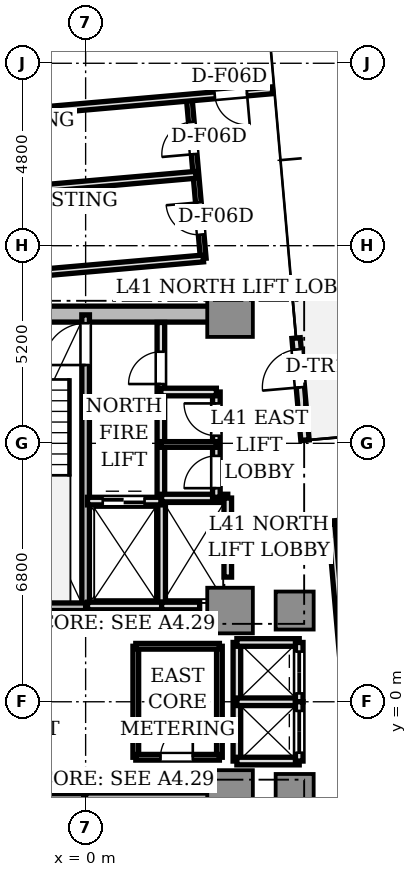
"""IFC4 building model, lengths in metres.
Left out: names, types, materials, properties, quantities, classifications, styles, units other than length and angle.
Written with IfcOpenShell. Run it as: python <this file> out.ifc"""

import sys

from ifc_helpers import new_model, si_unit, direction, frame, frame_2d, origin, origin_2d, place, context, subcontext, project, spatial, rectangle, extrude, source, transform, mapped, element, fill, save


model = new_model("IFC4")
c1 = context("Model", 3, precision=1e-05, world=origin(), true_north=direction((0.0, 1.0)))
c2 = subcontext(c1, "Body", "Model", "MODEL_VIEW")
j1 = project(units=[si_unit("LENGTHUNIT", "METRE"), si_unit("PLANEANGLEUNIT", "RADIAN")], contexts=[c1])
p1 = place(None, origin())
s1 = spatial("IfcSite", under=j1, at=p1, CompositionType="ELEMENT")
p2 = place(p1, origin())
s2 = spatial("IfcBuilding", under=s1, at=p2, CompositionType="ELEMENT")
p3 = place(p2, frame((0.0, 0.0, 150.6)))
s3 = spatial("IfcBuildingStorey", under=s2, at=p3, CompositionType="ELEMENT", Elevation=150.6)
p4 = place(p3, frame((-3.55, 10.2, 0.0), z_axis=(0.0, 0.0, 1.0), x_axis=(1.0, 0.0, 0.0)))
e1 = element("IfcWall", 1, at=p4, inside=s3, PredefinedType="SHEAR", context=c2, shape_type="SweptSolid", body=[
    extrude(rectangle(XDim=7.1, YDim=0.42, at=frame_2d((3.55, 0.0))), origin(), (0.0, 0.0, 1.0), 3.11),
])
m1 = source(origin(), c2, "Body", "SweptSolid", [
    extrude(rectangle(XDim=1.2, YDim=1.2, at=origin_2d()), origin(), (0.0, 0.0, 1.0), 3.11),
])
for number, where, z_axis, x_axis in (
    (2, (3.8, 2.4, 0.0), (0.0, 0.0, 1.0), (1.0, 0.0, 0.0)),
    (3, (3.8, 10.2, 0.0), (0.0, 0.0, 1.0), (1.0, 0.0, 0.0)),
    (4, (3.8, -2.4, 0.0), (0.0, 0.0, 1.0), (1.0, 0.0, 0.0)),
):
    element("IfcColumn", number, at=place(p3, frame(where, z_axis=z_axis, x_axis=x_axis)), inside=s3, PredefinedType="COLUMN", context=c2, shape_type="MappedRepresentation", body=[
        mapped(m1, transform((0.0, 0.0, 0.0), scale=1.0)),
    ])
m2 = source(origin(), c2, "Body", "SweptSolid", [
    extrude(rectangle(XDim=1.0, YDim=1.0, at=origin_2d()), origin(), (0.0, 0.0, 1.0), 3.11),
])
for number, where, z_axis, x_axis in (
    (5, (5.5, 2.4, 0.0), (0.0, 0.0, 1.0), (1.0, 0.0, 0.0)),
    (6, (5.5, -2.4, 0.0), (0.0, 0.0, 1.0), (1.0, 0.0, 0.0)),
):
    element("IfcColumn", number, at=place(p3, frame(where, z_axis=z_axis, x_axis=x_axis)), inside=s3, PredefinedType="COLUMN", context=c2, shape_type="MappedRepresentation", body=[
        mapped(m2, transform((0.0, 0.0, 0.0), scale=1.0)),
    ])
p5 = place(p3, frame((5.772, 6.879, 0.0), z_axis=(0.0, 0.0, 1.0), x_axis=(-0.087168071984, 0.996193619346, 0.0)))
e7 = element("IfcWall", 7, at=p5, inside=s3, PredefinedType="STANDARD", context=c2, shape_type="SweptSolid", body=[
    extrude(rectangle(XDim=2.7, YDim=0.22, at=frame_2d((1.35, 0.0))), origin(), (0.0, 0.0, 1.0), 3.11),
])
p6 = place(p5, frame((1.4, 0.0, 0.0)))
e8 = element("IfcOpeningElement", 8, at=p6, cuts=e7, PredefinedType="OPENING", context=c2, shape_type="SweptSolid", body=[
    extrude(rectangle(XDim=1.0, YDim=2.2, at=frame_2d((0.5, 1.1))), frame((0.0, 0.12, 0.0), z_axis=(0.0, -1.0, 0.0), x_axis=(1.0, 0.0, 0.0)), (0.0, 0.0, 1.0), 0.24),
])
p7 = place(p3, frame((0.0, 2.5, 0.0), z_axis=(0.0, 0.0, 1.0), x_axis=(0.0, 1.0, 0.0)))
e9 = element("IfcWall", 9, at=p7, inside=s3, PredefinedType="SOLIDWALL", context=c2, shape_type="SweptSolid", body=[
    extrude(rectangle(XDim=7.68, YDim=0.2, at=frame_2d((3.84, 0.0))), origin(), (0.0, 0.0, 1.0), 3.11),
])
p8 = place(p7, frame((6.36, 0.0, 0.0)))
e10 = element("IfcOpeningElement", 10, at=p8, cuts=e9, PredefinedType="OPENING", context=c2, shape_type="SweptSolid", body=[
    extrude(rectangle(XDim=1.1, YDim=2.15, at=frame_2d((0.55, 1.075))), frame((0.0, 0.11, 0.0), z_axis=(0.0, -1.0, 0.0), x_axis=(1.0, 0.0, 0.0)), (0.0, 0.0, 1.0), 0.22),
])
p9 = place(p3, frame((-3.72, 2.5, 0.0), z_axis=(0.0, 0.0, 1.0), x_axis=(1.0, 0.0, 0.0)))
e11 = element("IfcWall", 11, at=p9, inside=s3, PredefinedType="SOLIDWALL", context=c2, shape_type="SweptSolid", body=[
    extrude(rectangle(XDim=3.72, YDim=0.2, at=frame_2d((1.86, 0.0))), origin(), (0.0, 0.0, 1.0), 3.11),
])
p10 = place(p3, frame((0.0, -10.18, 0.0), z_axis=(0.0, 0.0, 1.0), x_axis=(0.0, 1.0, 0.0)))
e12 = element("IfcWall", 12, at=p10, inside=s3, PredefinedType="SOLIDWALL", context=c2, shape_type="SweptSolid", body=[
    extrude(rectangle(XDim=7.68, YDim=0.2, at=frame_2d((3.84, 0.0))), origin(), (0.0, 0.0, 1.0), 3.11),
])
p11 = place(p10, frame((0.28, 0.0, 0.0)))
e13 = element("IfcOpeningElement", 13, at=p11, cuts=e12, PredefinedType="OPENING", context=c2, shape_type="SweptSolid", body=[
    extrude(rectangle(XDim=1.1, YDim=2.15, at=frame_2d((0.55, 1.075))), frame((0.0, 0.11, 0.0), z_axis=(0.0, -1.0, 0.0), x_axis=(1.0, 0.0, 0.0)), (0.0, 0.0, 1.0), 0.22),
])
p12 = place(p3, frame((0.0, -2.5, 0.0), z_axis=(0.0, 0.0, 1.0), x_axis=(1.0, 0.0, 0.0)))
e14 = element("IfcWall", 14, at=p12, inside=s3, PredefinedType="SOLIDWALL", context=c2, shape_type="SweptSolid", body=[
    extrude(rectangle(XDim=3.72, YDim=0.2, at=frame_2d((1.86, 0.0))), origin(), (0.0, 0.0, 1.0), 3.11),
])
p13 = place(p3, frame((1.98, 5.32, 0.0), z_axis=(0.0, 0.0, 1.0), x_axis=(0.0, 1.0, 0.0)))
e15 = element("IfcWall", 15, at=p13, inside=s3, PredefinedType="SOLIDWALL", context=c2, shape_type="SweptSolid", body=[
    extrude(rectangle(XDim=4.66, YDim=0.2, at=frame_2d((2.33, 0.0))), origin(), (0.0, 0.0, 1.0), 2.66),
])
p14 = place(p13, frame((3.04, 0.0, 0.0)))
e16 = element("IfcOpeningElement", 16, at=p14, cuts=e15, PredefinedType="OPENING", context=c2, shape_type="SweptSolid", body=[
    extrude(rectangle(XDim=0.85, YDim=2.1, at=frame_2d((0.425, 1.05))), frame((0.0, 0.11, 0.0), z_axis=(0.0, -1.0, 0.0), x_axis=(1.0, 0.0, 0.0)), (0.0, 0.0, 1.0), 0.22),
])
p15 = place(p3, frame((2.0, 2.5, 0.0), z_axis=(0.0, 0.0, 1.0), x_axis=(0.0, 1.0, 0.0)))
e17 = element("IfcWall", 17, at=p15, inside=s3, PredefinedType="SOLIDWALL", context=c2, shape_type="SweptSolid", body=[
    extrude(rectangle(XDim=2.78, YDim=0.2, at=frame_2d((1.39, 0.0))), origin(), (0.0, 0.0, 1.0), 2.66),
])
p16 = place(p3, frame((0.05, 2.52, 0.0), z_axis=(0.0, 0.0, 1.0), x_axis=(1.0, 0.0, 0.0)))
e18 = element("IfcWall", 18, at=p16, inside=s3, PredefinedType="SOLIDWALL", context=c2, shape_type="SweptSolid", body=[
    extrude(rectangle(XDim=1.95, YDim=0.2, at=frame_2d((0.975, 0.0))), origin(), (0.0, 0.0, 1.0), 2.66),
])
p17 = place(p3, frame((0.05, 5.28, 0.0), z_axis=(0.0, 0.0, 1.0), x_axis=(1.0, 0.0, 0.0)))
e19 = element("IfcWall", 19, at=p17, inside=s3, PredefinedType="SOLIDWALL", context=c2, shape_type="SweptSolid", body=[
    extrude(rectangle(XDim=1.93, YDim=0.2, at=frame_2d((0.965, 0.0))), origin(), (0.0, 0.0, 1.0), 2.66),
])
p18 = place(p17, frame((0.4, 0.0, 0.0)))
e20 = element("IfcOpeningElement", 20, at=p18, cuts=e19, PredefinedType="OPENING", context=c2, shape_type="SweptSolid", body=[
    extrude(rectangle(XDim=1.1, YDim=2.2, at=frame_2d((0.55, 1.1))), frame((0.0, 0.11, 0.0), z_axis=(0.0, -1.0, 0.0), x_axis=(1.0, 0.0, 0.0)), (0.0, 0.0, 1.0), 0.22),
])
p19 = place(p3, frame((-2.0, -2.52, 0.0), z_axis=(0.0, 0.0, 1.0), x_axis=(1.0, 0.0, 0.0)))
e21 = element("IfcWall", 21, at=p19, inside=s3, PredefinedType="SOLIDWALL", context=c2, shape_type="SweptSolid", body=[
    extrude(rectangle(XDim=1.95, YDim=0.2, at=frame_2d((0.975, 0.0))), origin(), (0.0, 0.0, 1.0), 2.66),
])
p20 = place(p3, frame((2.0, 2.52, 0.0), z_axis=(0.0, 0.0, 1.0), x_axis=(1.0, 0.0, 0.0)))
e22 = element("IfcWall", 22, at=p20, inside=s3, PredefinedType="SOLIDWALL", context=c2, shape_type="SweptSolid", body=[
    extrude(rectangle(XDim=1.0, YDim=0.2, at=frame_2d((0.5, 0.0))), origin(), (0.0, 0.0, 1.0), 2.66),
])
p21 = place(p3, frame((2.0, 5.36, 0.0), z_axis=(0.0, 0.0, 1.0), x_axis=(1.0, 0.0, 0.0)))
e23 = element("IfcWall", 23, at=p21, inside=s3, PredefinedType="SOLIDWALL", context=c2, shape_type="SweptSolid", body=[
    extrude(rectangle(XDim=1.74, YDim=0.2, at=frame_2d((0.87, 0.0))), origin(), (0.0, 0.0, 1.0), 2.66),
])
p22 = place(p3, frame((3.74, 3.28, 0.0), z_axis=(0.0, 0.0, 1.0), x_axis=(0.0, 1.0, 0.0)))
e24 = element("IfcWall", 24, at=p22, inside=s3, PredefinedType="SOLIDWALL", context=c2, shape_type="SweptSolid", body=[
    extrude(rectangle(XDim=2.08, YDim=0.2, at=frame_2d((1.04, 0.0))), origin(), (0.0, 0.0, 1.0), 2.66),
])
p23 = place(p22, frame((0.44, 0.0, 0.0)))
e25 = element("IfcOpeningElement", 25, at=p23, cuts=e24, PredefinedType="OPENING", context=c2, shape_type="SweptSolid", body=[
    extrude(rectangle(XDim=1.2, YDim=2.2, at=frame_2d((0.6, 1.1))), frame((0.0, 0.11, 0.0), z_axis=(0.0, -1.0, 0.0), x_axis=(1.0, 0.0, 0.0)), (0.0, 0.0, 1.0), 0.22),
])
p24 = place(p3, frame((3.98, -1.56, 0.0), z_axis=(0.0, 0.0, 1.0), x_axis=(0.0, 1.0, 0.0)))
e26 = element("IfcWall", 26, at=p24, inside=s3, PredefinedType="SOLIDWALL", context=c2, shape_type="SweptSolid", body=[
    extrude(rectangle(XDim=3.12, YDim=0.2, at=frame_2d((1.56, 0.0))), origin(), (0.0, 0.0, 1.0), 2.28),
])
for number, where, z_axis, x_axis in (
    (27, (3.98, 1.56, 0.0), (0.0, 0.0, 1.0), (1.0, 0.0, 0.0)),
    (28, (3.98, -1.56, 0.0), (0.0, 0.0, 1.0), (1.0, 0.0, 0.0)),
    (29, (3.98, 0.0, 0.0), (0.0, 0.0, 1.0), (1.0, 0.0, 0.0)),
):
    element("IfcWall", number, at=place(p3, frame(where, z_axis=z_axis, x_axis=x_axis)), inside=s3, PredefinedType="SOLIDWALL", context=c2, shape_type="SweptSolid", body=[
        extrude(rectangle(XDim=1.64, YDim=0.2, at=frame_2d((0.82, 0.0))), origin(), (0.0, 0.0, 1.0), 2.66),
    ])
p25 = place(p3, frame((5.62, 0.0, 0.0), z_axis=(0.0, 0.0, 1.0), x_axis=(0.0, 1.0, 0.0)))
e30 = element("IfcWall", 30, at=p25, inside=s3, PredefinedType="SOLIDWALL", context=c2, shape_type="SweptSolid", body=[
    extrude(rectangle(XDim=1.56, YDim=0.2, at=frame_2d((0.78, 0.0))), origin(), (0.0, 0.0, 1.0), 2.66),
])
p26 = place(p25, frame((0.22, 0.0, 0.0)))
e31 = element("IfcOpeningElement", 31, at=p26, cuts=e30, PredefinedType="OPENING", context=c2, shape_type="SweptSolid", body=[
    extrude(rectangle(XDim=1.1, YDim=2.2, at=frame_2d((0.55, 1.1))), frame((0.0, 0.11, 0.0), z_axis=(0.0, -1.0, 0.0), x_axis=(1.0, 0.0, 0.0)), (0.0, 0.0, 1.0), 0.22),
])
p27 = place(p3, frame((5.62, -1.56, 0.0), z_axis=(0.0, 0.0, 1.0), x_axis=(0.0, 1.0, 0.0)))
e32 = element("IfcWall", 32, at=p27, inside=s3, PredefinedType="SOLIDWALL", context=c2, shape_type="SweptSolid", body=[
    extrude(rectangle(XDim=1.56, YDim=0.2, at=frame_2d((0.78, 0.0))), origin(), (0.0, 0.0, 1.0), 2.66),
])
p28 = place(p27, frame((0.22, 0.0, 0.0)))
e33 = element("IfcOpeningElement", 33, at=p28, cuts=e32, PredefinedType="OPENING", context=c2, shape_type="SweptSolid", body=[
    extrude(rectangle(XDim=1.1, YDim=2.2, at=frame_2d((0.55, 1.1))), frame((0.0, 0.11, 0.0), z_axis=(0.0, -1.0, 0.0), x_axis=(1.0, 0.0, 0.0)), (0.0, 0.0, 1.0), 0.22),
])
p29 = place(p3, frame((3.44, 5.38, 0.0), z_axis=(0.0, 0.0, 1.0), x_axis=(0.0, 1.0, 0.0)))
e34 = element("IfcWall", 34, at=p29, inside=s3, PredefinedType="SOLIDWALL", context=c2, shape_type="SweptSolid", body=[
    extrude(rectangle(XDim=2.77, YDim=0.2, at=frame_2d((1.385, 0.0))), origin(), (0.0, 0.0, 1.0), 2.66),
])
p30 = place(p29, frame((0.24, 0.0, 0.0)))
e35 = element("IfcOpeningElement", 35, at=p30, cuts=e34, PredefinedType="OPENING", context=c2, shape_type="SweptSolid", body=[
    extrude(rectangle(XDim=0.85, YDim=2.1, at=frame_2d((0.425, 1.05))), frame((0.0, 0.11, 0.0), z_axis=(0.0, -1.0, 0.0), x_axis=(1.0, 0.0, 0.0)), (0.0, 0.0, 1.0), 0.22),
])
p31 = place(p29, frame((1.62, 0.0, 0.0)))
e36 = element("IfcOpeningElement", 36, at=p31, cuts=e34, PredefinedType="OPENING", context=c2, shape_type="SweptSolid", body=[
    extrude(rectangle(XDim=0.85, YDim=2.1, at=frame_2d((0.425, 1.05))), frame((0.0, 0.11, 0.0), z_axis=(0.0, -1.0, 0.0), x_axis=(1.0, 0.0, 0.0)), (0.0, 0.0, 1.0), 0.22),
])
p32 = place(p3, frame((1.98, 8.15, 0.0), z_axis=(0.0, 0.0, 1.0), x_axis=(1.0, 0.0, 0.0)))
e37 = element("IfcWall", 37, at=p32, inside=s3, PredefinedType="SOLIDWALL", context=c2, shape_type="SweptSolid", body=[
    extrude(rectangle(XDim=1.46, YDim=0.2, at=frame_2d((0.73, 0.0))), origin(), (0.0, 0.0, 1.0), 2.66),
])
p33 = place(p3, frame((1.98, 6.77, 0.0), z_axis=(0.0, 0.0, 1.0), x_axis=(1.0, 0.0, 0.0)))
e38 = element("IfcWall", 38, at=p33, inside=s3, PredefinedType="PARTITIONING", context=c2, shape_type="SweptSolid", body=[
    extrude(rectangle(XDim=1.46, YDim=0.15, at=frame_2d((0.73, 0.0))), origin(), (0.0, 0.0, 1.0), 2.66),
])
p34 = place(p3, frame((1.32, -1.46, 0.0), z_axis=(0.0, 0.0, 1.0), x_axis=(0.0, 1.0, 0.0)))
e39 = element("IfcWall", 39, at=p34, inside=s3, PredefinedType="PARTITIONING", context=c2, shape_type="SweptSolid", body=[
    extrude(rectangle(XDim=2.92, YDim=0.15, at=frame_2d((1.46, 0.0))), origin(), (0.0, 0.0, 1.0), 2.66),
])
p35 = place(p3, frame((3.52, -1.46, 0.0), z_axis=(0.0, 0.0, 1.0), x_axis=(0.0, 1.0, 0.0)))
e40 = element("IfcWall", 40, at=p35, inside=s3, PredefinedType="PARTITIONING", context=c2, shape_type="SweptSolid", body=[
    extrude(rectangle(XDim=2.92, YDim=0.15, at=frame_2d((1.46, 0.0))), origin(), (0.0, 0.0, 1.0), 2.28),
])
p36 = place(p3, frame((1.32, 1.46, 0.0), z_axis=(0.0, 0.0, 1.0), x_axis=(1.0, 0.0, 0.0)))
e41 = element("IfcWall", 41, at=p36, inside=s3, PredefinedType="PARTITIONING", context=c2, shape_type="SweptSolid", body=[
    extrude(rectangle(XDim=2.2, YDim=0.15, at=frame_2d((1.1, 0.0))), origin(), (0.0, 0.0, 1.0), 2.66),
])
p37 = place(p3, frame((1.32, -1.46, 0.0), z_axis=(0.0, 0.0, 1.0), x_axis=(1.0, 0.0, 0.0)))
e42 = element("IfcWall", 42, at=p37, inside=s3, PredefinedType="PARTITIONING", context=c2, shape_type="SweptSolid", body=[
    extrude(rectangle(XDim=2.2, YDim=0.15, at=frame_2d((1.1, 0.0))), origin(), (0.0, 0.0, 1.0), 2.66),
])
p38 = place(p37, frame((0.65, 0.0, 0.0)))
e43 = element("IfcOpeningElement", 43, at=p38, cuts=e42, PredefinedType="OPENING", context=c2, shape_type="SweptSolid", body=[
    extrude(rectangle(XDim=0.85, YDim=2.1, at=frame_2d((0.425, 1.05))), frame((0.0, 0.085, 0.0), z_axis=(0.0, -1.0, 0.0), x_axis=(1.0, 0.0, 0.0)), (0.0, 0.0, 1.0), 0.17),
])
p39 = place(p3, frame((6.467, 4.681, 0.0), z_axis=(0.0, 0.0, 1.0), x_axis=(0.996195452949, 0.087147114263, 0.0)))
e44 = element("IfcWall", 44, at=p39, inside=s3, PredefinedType="PARTITIONING", context=c2, shape_type="SweptSolid", body=[
    extrude(rectangle(XDim=8.55, YDim=0.15, at=frame_2d((4.275, 0.0))), origin(), (0.0, 0.0, 1.0), 2.66),
])
p40 = place(p39, frame((1.491, 0.0, 0.0)))
e45 = element("IfcOpeningElement", 45, at=p40, cuts=e44, PredefinedType="OPENING", context=c2, shape_type="SweptSolid", body=[
    extrude(rectangle(XDim=0.85, YDim=2.1, at=frame_2d((0.425, 1.05))), frame((0.0, 0.085, 0.0), z_axis=(0.0, -1.0, 0.0), x_axis=(1.0, 0.0, 0.0)), (0.0, 0.0, 1.0), 0.17),
])
p41 = place(p39, frame((4.792, 0.0, 0.0)))
e46 = element("IfcOpeningElement", 46, at=p41, cuts=e44, PredefinedType="OPENING", context=c2, shape_type="SweptSolid", body=[
    extrude(rectangle(XDim=0.85, YDim=2.1, at=frame_2d((0.425, 1.05))), frame((0.0, 0.085, 0.0), z_axis=(0.0, -1.0, 0.0), x_axis=(1.0, 0.0, 0.0)), (0.0, 0.0, 1.0), 0.17),
])
p42 = place(p3, frame((7.373, -5.679, 0.0), z_axis=(0.0, 0.0, 1.0), x_axis=(-0.087163455754, 0.996194023261, 0.0)))
e47 = element("IfcWall", 47, at=p42, inside=s3, PredefinedType="PARTITIONING", context=c2, shape_type="SweptSolid", body=[
    extrude(rectangle(XDim=10.4, YDim=0.18, at=frame_2d((5.2, 0.0))), origin(), (0.0, 0.0, 1.0), 2.66),
])
p43 = place(p3, frame((3.095, 11.664, 0.0), z_axis=(0.0, 0.0, 1.0), x_axis=(-0.087142722004, 0.996195837173, 0.0)))
e48 = element("IfcWall", 48, at=p43, inside=s3, PredefinedType="PARTITIONING", context=c2, shape_type="SweptSolid", body=[
    extrude(rectangle(XDim=4.25, YDim=0.15, at=frame_2d((2.125, 0.0))), origin(), (0.0, 0.0, 1.0), 2.66),
])
p44 = place(p43, frame((0.63, 0.0, 0.0)))
e49 = element("IfcOpeningElement", 49, at=p44, cuts=e48, PredefinedType="OPENING", context=c2, shape_type="SweptSolid", body=[
    extrude(rectangle(XDim=0.85, YDim=2.1, at=frame_2d((0.425, 1.05))), frame((0.0, 0.085, 0.0), z_axis=(0.0, -1.0, 0.0), x_axis=(1.0, 0.0, 0.0)), (0.0, 0.0, 1.0), 0.17),
])
p45 = place(p43, frame((2.755, 0.0, 0.0)))
e50 = element("IfcOpeningElement", 50, at=p45, cuts=e48, PredefinedType="OPENING", context=c2, shape_type="SweptSolid", body=[
    extrude(rectangle(XDim=0.85, YDim=2.1, at=frame_2d((0.425, 1.05))), frame((0.0, 0.085, 0.0), z_axis=(0.0, -1.0, 0.0), x_axis=(1.0, 0.0, 0.0)), (0.0, 0.0, 1.0), 0.17),
])
p46 = place(p3, frame((3.095, 11.664, 0.0), z_axis=(0.0, 0.0, 1.0), x_axis=(-0.996196061386, -0.087140158824, 0.0)))
e51 = element("IfcWall", 51, at=p46, inside=s3, PredefinedType="PARTITIONING", context=c2, shape_type="SweptSolid", body=[
    extrude(rectangle(XDim=10.4, YDim=0.18, at=frame_2d((5.2, 0.0))), origin(), (0.0, 0.0, 1.0), 2.66),
])
p47 = place(p3, frame((2.903, 13.866, 0.0), z_axis=(0.0, 0.0, 1.0), x_axis=(-0.996194201607, -0.087161417409, 0.0)))
e52 = element("IfcWall", 52, at=p47, inside=s3, PredefinedType="PARTITIONING", context=c2, shape_type="SweptSolid", body=[
    extrude(rectangle(XDim=10.4, YDim=0.18, at=frame_2d((5.2, 0.0))), origin(), (0.0, 0.0, 1.0), 2.66),
])
p48 = place(p3, frame((4.917, 16.09, 0.0), z_axis=(0.0, 0.0, 1.0), x_axis=(-0.996196619285, -0.087133780622, 0.0)))
e53 = element("IfcWall", 53, at=p48, inside=s3, PredefinedType="PARTITIONING", context=c2, shape_type="SweptSolid", body=[
    extrude(rectangle(XDim=12.6, YDim=0.18, at=frame_2d((6.3, 0.0))), origin(), (0.0, 0.0, 1.0), 2.66),
])
p49 = place(p48, frame((0.675, 0.0, 0.0)))
e54 = element("IfcOpeningElement", 54, at=p49, cuts=e53, PredefinedType="OPENING", context=c2, shape_type="SweptSolid", body=[
    extrude(rectangle(XDim=0.85, YDim=2.1, at=frame_2d((0.425, 1.05))), frame((0.0, 0.1, 0.0), z_axis=(0.0, -1.0, 0.0), x_axis=(1.0, 0.0, 0.0)), (0.0, 0.0, 1.0), 0.2),
])
m3 = source(origin(), c2, "Body", "SweptSolid", [
    extrude(rectangle(XDim=1.0, YDim=0.05, at=origin_2d()), origin(), (0.0, 0.0, 1.0), 2.2),
])
p50 = place(p6, frame((0.5, 0.0, 0.0)))
e55 = element("IfcDoor", 55, at=p50, inside=s3, OperationType="SINGLE_SWING_LEFT", PredefinedType="DOOR", context=c2, shape_type="MappedRepresentation", body=[
    mapped(m3, transform((0.0, 0.0, 0.0), scale=1.0)),
])
fill(e8, e55)
m4 = source(origin(), c2, "Body", "SweptSolid", [
    extrude(rectangle(XDim=1.1, YDim=0.05, at=origin_2d()), origin(), (0.0, 0.0, 1.0), 2.15),
])
p51 = place(p8, frame((0.55, 0.0, 0.0)))
e56 = element("IfcDoor", 56, at=p51, inside=s3, OperationType="SINGLE_SWING_LEFT", PredefinedType="DOOR", context=c2, shape_type="MappedRepresentation", body=[
    mapped(m4, transform((0.0, 0.0, 0.0), scale=1.0)),
])
fill(e10, e56)
m5 = source(origin(), c2, "Body", "SweptSolid", [
    extrude(rectangle(XDim=0.85, YDim=0.05, at=origin_2d()), origin(), (0.0, 0.0, 1.0), 2.1),
])
p52 = place(p14, frame((0.425, 0.0, 0.0)))
e57 = element("IfcDoor", 57, at=p52, inside=s3, OperationType="SINGLE_SWING_LEFT", PredefinedType="DOOR", context=c2, shape_type="MappedRepresentation", body=[
    mapped(m5, transform((0.0, 0.0, 0.0), scale=1.0)),
])
fill(e16, e57)
m6 = source(origin(), c2, "Body", "SweptSolid", [
    extrude(rectangle(XDim=1.1, YDim=0.05, at=origin_2d()), origin(), (0.0, 0.0, 1.0), 2.2),
])
p53 = place(p18, frame((0.55, 0.0, 0.0)))
e58 = element("IfcDoor", 58, at=p53, inside=s3, OperationType="DOUBLE_DOOR_SLIDING", PredefinedType="DOOR", context=c2, shape_type="MappedRepresentation", body=[
    mapped(m6, transform((0.0, 0.0, 0.0), scale=1.0)),
])
fill(e20, e58)
m7 = source(origin(), c2, "Body", "SweptSolid", [
    extrude(rectangle(XDim=1.2, YDim=0.05, at=origin_2d()), origin(), (0.0, 0.0, 1.0), 2.2),
])
p54 = place(p23, frame((0.6, 0.0, 0.0)))
e59 = element("IfcDoor", 59, at=p54, inside=s3, OperationType="DOUBLE_DOOR_SLIDING", PredefinedType="DOOR", context=c2, shape_type="MappedRepresentation", body=[
    mapped(m7, transform((0.0, 0.0, 0.0), scale=1.0)),
])
fill(e25, e59)
p55 = place(p26, frame((0.55, 0.0, 0.0)))
e60 = element("IfcDoor", 60, at=p55, inside=s3, OperationType="DOUBLE_DOOR_SLIDING", PredefinedType="DOOR", context=c2, shape_type="MappedRepresentation", body=[
    mapped(m6, transform((0.0, 0.0, 0.0), scale=1.0)),
])
fill(e31, e60)
p56 = place(p28, frame((0.55, 0.0, 0.0)))
e61 = element("IfcDoor", 61, at=p56, inside=s3, OperationType="DOUBLE_DOOR_SLIDING", PredefinedType="DOOR", context=c2, shape_type="MappedRepresentation", body=[
    mapped(m6, transform((0.0, 0.0, 0.0), scale=1.0)),
])
fill(e33, e61)
p57 = place(p30, frame((0.425, 0.0, 0.0)))
e62 = element("IfcDoor", 62, at=p57, inside=s3, OperationType="SINGLE_SWING_LEFT", PredefinedType="DOOR", context=c2, shape_type="MappedRepresentation", body=[
    mapped(m5, transform((0.0, 0.0, 0.0), scale=1.0)),
])
fill(e35, e62)
p58 = place(p31, frame((0.425, 0.0, 0.0)))
e63 = element("IfcDoor", 63, at=p58, inside=s3, OperationType="SINGLE_SWING_RIGHT", PredefinedType="DOOR", context=c2, shape_type="MappedRepresentation", body=[
    mapped(m5, transform((0.0, 0.0, 0.0), scale=1.0)),
])
fill(e36, e63)
p59 = place(p38, frame((0.425, 0.0, 0.0)))
e64 = element("IfcDoor", 64, at=p59, inside=s3, OperationType="SINGLE_SWING_RIGHT", PredefinedType="DOOR", context=c2, shape_type="MappedRepresentation", body=[
    mapped(m5, transform((0.0, 0.0, 0.0), scale=1.0)),
])
fill(e43, e64)
p60 = place(p44, frame((0.425, 0.0, 0.0)))
e65 = element("IfcDoor", 65, at=p60, inside=s3, OperationType="SINGLE_SWING_RIGHT", PredefinedType="DOOR", context=c2, shape_type="MappedRepresentation", body=[
    mapped(m5, transform((0.0, 0.0, 0.0), scale=1.0)),
])
fill(e49, e65)
p61 = place(p45, frame((0.425, 0.0, 0.0)))
e66 = element("IfcDoor", 66, at=p61, inside=s3, OperationType="SINGLE_SWING_LEFT", PredefinedType="DOOR", context=c2, shape_type="MappedRepresentation", body=[
    mapped(m5, transform((0.0, 0.0, 0.0), scale=1.0)),
])
fill(e50, e66)
p62 = place(p49, frame((0.425, 0.0, 0.0)))
e67 = element("IfcDoor", 67, at=p62, inside=s3, OperationType="SINGLE_SWING_LEFT", PredefinedType="DOOR", context=c2, shape_type="MappedRepresentation", body=[
    mapped(m5, transform((0.0, 0.0, 0.0), scale=1.0)),
])
fill(e54, e67)
save(model, sys.argv[1])
